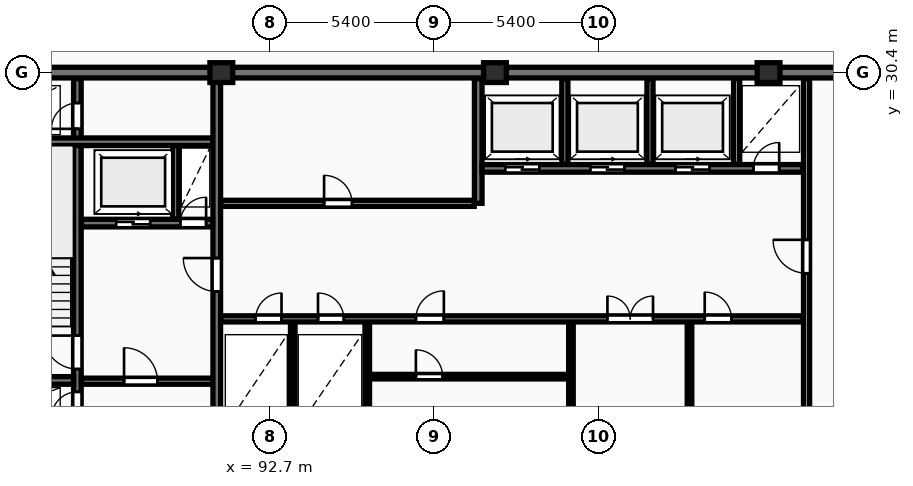
"""IFC4 building model, lengths in metres.
Left out: names, types, materials, properties, quantities, classifications, styles, units other than length and angle.
Written with IfcOpenShell. Run it as: python <this file> out.ifc"""

import sys

from ifc_helpers import new_model, si_unit, direction, frame, frame_2d, origin, origin_2d, place, context, subcontext, project, spatial, rectangle, extrude, element, fill, save


model = new_model("IFC4")
c1 = context("Model", 3, precision=1e-05, world=origin(), true_north=direction((0.0, 1.0)))
c2 = subcontext(c1, "Body", "Model", "MODEL_VIEW")
j1 = project(units=[si_unit("LENGTHUNIT", "METRE"), si_unit("PLANEANGLEUNIT", "RADIAN")], contexts=[c1])
p1 = place(None, origin())
s1 = spatial("IfcSite", under=j1, at=p1, CompositionType="ELEMENT")
p2 = place(p1, origin())
s2 = spatial("IfcBuilding", under=s1, at=p2, CompositionType="ELEMENT")
p3 = place(p2, frame((0.0, 0.0, 201.1)))
s3 = spatial("IfcBuildingStorey", under=s2, at=p3, CompositionType="ELEMENT", Elevation=201.1)
for number, where, z_axis, x_axis in (
    (1, (91.1, 30.4, 0.0), (0.0, 0.0, 1.0), (1.0, 0.0, 0.0)),
    (2, (100.1, 30.4, 0.0), (0.0, 0.0, 1.0), (1.0, 0.0, 0.0)),
    (3, (109.1, 30.4, 0.0), (0.0, 0.0, 1.0), (1.0, 0.0, 0.0)),
):
    element("IfcColumn", number, at=place(p3, frame(where, z_axis=z_axis, x_axis=x_axis)), inside=s3, PredefinedType="COLUMN", context=c2, shape_type="SweptSolid", body=[
        extrude(rectangle(XDim=0.75, YDim=0.65, at=origin_2d()), origin(), (0.0, 0.0, 1.0), 3.25),
    ])
p4 = place(p3, frame((81.925, 30.4, 0.0), z_axis=(0.0, 0.0, 1.0), x_axis=(1.0, 0.0, 0.0)))
e4 = element("IfcWall", 4, at=p4, inside=s3, PredefinedType="SHEAR", context=c2, shape_type="SweptSolid", body=[
    extrude(rectangle(XDim=36.265, YDim=0.35, at=frame_2d((18.132, 0.0))), origin(), (0.0, 0.0, 1.0), 3.25),
])
p5 = place(p3, frame((86.365, 18.6, 0.0), z_axis=(0.0, 0.0, 1.0), x_axis=(0.0, 1.0, 0.0)))
e5 = element("IfcWall", 5, at=p5, inside=s3, PredefinedType="SHEAR", context=c2, shape_type="SweptSolid", body=[
    extrude(rectangle(XDim=11.6, YDim=0.25, at=frame_2d((5.8, 0.0))), origin(), (0.0, 0.0, 1.0), 3.25),
])
p6 = place(p5, frame((0.45, 0.0, 0.0)))
e6 = element("IfcOpeningElement", 6, at=p6, cuts=e5, PredefinedType="OPENING", context=c2, shape_type="SweptSolid", body=[
    extrude(rectangle(XDim=0.85, YDim=2.05, at=frame_2d((0.425, 1.025))), frame((0.0, 0.135, 0.0), z_axis=(0.0, -1.0, 0.0), x_axis=(1.0, 0.0, 0.0)), (0.0, 0.0, 1.0), 0.27),
])
p7 = place(p5, frame((2.05, 0.0, 0.0)))
e7 = element("IfcOpeningElement", 7, at=p7, cuts=e5, PredefinedType="OPENING", context=c2, shape_type="SweptSolid", body=[
    extrude(rectangle(XDim=1.1, YDim=2.1, at=frame_2d((0.55, 1.05))), frame((0.0, 0.135, 0.0), z_axis=(0.0, -1.0, 0.0), x_axis=(1.0, 0.0, 0.0)), (0.0, 0.0, 1.0), 0.27),
])
p8 = place(p5, frame((9.95, 0.0, 0.0)))
e8 = element("IfcOpeningElement", 8, at=p8, cuts=e5, PredefinedType="OPENING", context=c2, shape_type="SweptSolid", body=[
    extrude(rectangle(XDim=0.85, YDim=2.05, at=frame_2d((0.425, 1.025))), frame((0.0, 0.135, 0.0), z_axis=(0.0, -1.0, 0.0), x_axis=(1.0, 0.0, 0.0)), (0.0, 0.0, 1.0), 0.27),
])
p9 = place(p3, frame((83.0, 20.275, 0.0), z_axis=(0.0, 0.0, 1.0), x_axis=(1.0, 0.0, 0.0)))
e9 = element("IfcWall", 9, at=p9, inside=s3, PredefinedType="SHEAR", context=c2, shape_type="SweptSolid", body=[
    extrude(rectangle(XDim=3.24, YDim=0.25, at=frame_2d((1.62, 0.0))), origin(), (0.0, 0.0, 1.0), 3.25),
])
p10 = place(p3, frame((83.0, 28.125, 0.0), z_axis=(0.0, 0.0, 1.0), x_axis=(1.0, 0.0, 0.0)))
e10 = element("IfcWall", 10, at=p10, inside=s3, PredefinedType="SHEAR", context=c2, shape_type="SweptSolid", body=[
    extrude(rectangle(XDim=7.82, YDim=0.25, at=frame_2d((3.91, 0.0))), origin(), (0.0, 0.0, 1.0), 3.25),
])
p11 = place(p3, frame((86.5, 25.45, 0.0), z_axis=(0.0, 0.0, 1.0), x_axis=(1.0, 0.0, 0.0)))
e11 = element("IfcWall", 11, at=p11, inside=s3, PredefinedType="SHEAR", context=c2, shape_type="SweptSolid", body=[
    extrude(rectangle(XDim=4.32, YDim=0.25, at=frame_2d((2.16, 0.0))), origin(), (0.0, 0.0, 1.0), 3.25),
])
p12 = place(p11, frame((1.14, 0.0, 0.0)))
e12 = element("IfcOpeningElement", 12, at=p12, cuts=e11, PredefinedType="OPENING", context=c2, shape_type="SweptSolid", body=[
    extrude(rectangle(XDim=1.12, YDim=2.12, at=frame_2d((0.56, 1.06))), frame((0.0, 0.135, 0.0), z_axis=(0.0, -1.0, 0.0), x_axis=(1.0, 0.0, 0.0)), (0.0, 0.0, 1.0), 0.27),
])
p13 = place(p11, frame((3.25, 0.0, 0.0)))
e13 = element("IfcOpeningElement", 13, at=p13, cuts=e11, PredefinedType="OPENING", context=c2, shape_type="SweptSolid", body=[
    extrude(rectangle(XDim=0.85, YDim=2.05, at=frame_2d((0.425, 1.025))), frame((0.0, 0.135, 0.0), z_axis=(0.0, -1.0, 0.0), x_axis=(1.0, 0.0, 0.0)), (0.0, 0.0, 1.0), 0.27),
])
p14 = place(p3, frame((89.6, 25.58, 0.0), z_axis=(0.0, 0.0, 1.0), x_axis=(0.0, 1.0, 0.0)))
e14 = element("IfcWall", 14, at=p14, inside=s3, PredefinedType="PARTITIONING", context=c2, shape_type="SweptSolid", body=[
    extrude(rectangle(XDim=2.42, YDim=0.2, at=frame_2d((1.21, 0.0))), origin(), (0.0, 0.0, 1.0), 2.97),
])
p15 = place(p3, frame((86.5, 20.25, 0.0), z_axis=(0.0, 0.0, 1.0), x_axis=(1.0, 0.0, 0.0)))
e15 = element("IfcWall", 15, at=p15, inside=s3, PredefinedType="PARTITIONING", context=c2, shape_type="SweptSolid", body=[
    extrude(rectangle(XDim=4.32, YDim=0.2, at=frame_2d((2.16, 0.0))), origin(), (0.0, 0.0, 1.0), 2.97),
])
p16 = place(p15, frame((1.4, 0.0, 0.0)))
e16 = element("IfcOpeningElement", 16, at=p16, cuts=e15, PredefinedType="OPENING", context=c2, shape_type="SweptSolid", body=[
    extrude(rectangle(XDim=1.1, YDim=2.1, at=frame_2d((0.55, 1.05))), frame((0.0, 0.11, 0.0), z_axis=(0.0, -1.0, 0.0), x_axis=(1.0, 0.0, 0.0)), (0.0, 0.0, 1.0), 0.22),
])
p17 = place(p3, frame((90.95, 18.6, 0.0), z_axis=(0.0, 0.0, 1.0), x_axis=(0.0, 1.0, 0.0)))
e17 = element("IfcWall", 17, at=p17, inside=s3, PredefinedType="SHEAR", context=c2, shape_type="SweptSolid", body=[
    extrude(rectangle(XDim=11.6, YDim=0.25, at=frame_2d((5.8, 0.0))), origin(), (0.0, 0.0, 1.0), 3.25),
])
p18 = place(p17, frame((4.6, 0.0, 0.0)))
e18 = element("IfcOpeningElement", 18, at=p18, cuts=e17, PredefinedType="OPENING", context=c2, shape_type="SweptSolid", body=[
    extrude(rectangle(XDim=1.1, YDim=2.1, at=frame_2d((0.55, 1.05))), frame((0.0, 0.135, 0.0), z_axis=(0.0, -1.0, 0.0), x_axis=(1.0, 0.0, 0.0)), (0.0, 0.0, 1.0), 0.27),
])
p19 = place(p3, frame((91.08, 26.1, 0.0), z_axis=(0.0, 0.0, 1.0), x_axis=(1.0, 0.0, 0.0)))
e19 = element("IfcWall", 19, at=p19, inside=s3, PredefinedType="PARTITIONING", context=c2, shape_type="SweptSolid", body=[
    extrude(rectangle(XDim=8.34, YDim=0.2, at=frame_2d((4.17, 0.0))), origin(), (0.0, 0.0, 1.0), 2.97),
])
p20 = place(p19, frame((3.4, 0.0, 0.0)))
e20 = element("IfcOpeningElement", 20, at=p20, cuts=e19, PredefinedType="OPENING", context=c2, shape_type="SweptSolid", body=[
    extrude(rectangle(XDim=0.92, YDim=2.08, at=frame_2d((0.46, 1.04))), frame((0.0, 0.11, 0.0), z_axis=(0.0, -1.0, 0.0), x_axis=(1.0, 0.0, 0.0)), (0.0, 0.0, 1.0), 0.22),
])
p21 = place(p3, frame((99.55, 26.1, 0.0), z_axis=(0.0, 0.0, 1.0), x_axis=(0.0, 1.0, 0.0)))
e21 = element("IfcWall", 21, at=p21, inside=s3, PredefinedType="SHEAR", context=c2, shape_type="SweptSolid", body=[
    extrude(rectangle(XDim=4.1, YDim=0.25, at=frame_2d((2.05, 0.0))), origin(), (0.0, 0.0, 1.0), 3.25),
])
for number, where, z_axis, x_axis in (
    (22, (102.4, 27.38, 0.0), (0.0, 0.0, 1.0), (0.0, 1.0, 0.0)),
    (23, (105.2, 27.38, 0.0), (0.0, 0.0, 1.0), (0.0, 1.0, 0.0)),
    (24, (108.05, 27.38, 0.0), (0.0, 0.0, 1.0), (0.0, 1.0, 0.0)),
):
    element("IfcWall", number, at=place(p3, frame(where, z_axis=z_axis, x_axis=x_axis)), inside=s3, PredefinedType="PARTITIONING", context=c2, shape_type="SweptSolid", body=[
        extrude(rectangle(XDim=2.82, YDim=0.2, at=frame_2d((1.41, 0.0))), origin(), (0.0, 0.0, 1.0), 2.97),
    ])
p22 = place(p3, frame((99.68, 27.25, 0.0), z_axis=(0.0, 0.0, 1.0), x_axis=(1.0, 0.0, 0.0)))
e25 = element("IfcWall", 25, at=p22, inside=s3, PredefinedType="SHEAR", context=c2, shape_type="SweptSolid", body=[
    extrude(rectangle(XDim=10.54, YDim=0.25, at=frame_2d((5.27, 0.0))), origin(), (0.0, 0.0, 1.0), 3.25),
])
p23 = place(p22, frame((0.76, 0.0, 0.0)))
e26 = element("IfcOpeningElement", 26, at=p23, cuts=e25, PredefinedType="OPENING", context=c2, shape_type="SweptSolid", body=[
    extrude(rectangle(XDim=1.12, YDim=2.12, at=frame_2d((0.56, 1.06))), frame((0.0, 0.135, 0.0), z_axis=(0.0, -1.0, 0.0), x_axis=(1.0, 0.0, 0.0)), (0.0, 0.0, 1.0), 0.27),
])
p24 = place(p22, frame((3.56, 0.0, 0.0)))
e27 = element("IfcOpeningElement", 27, at=p24, cuts=e25, PredefinedType="OPENING", context=c2, shape_type="SweptSolid", body=[
    extrude(rectangle(XDim=1.12, YDim=2.12, at=frame_2d((0.56, 1.06))), frame((0.0, 0.135, 0.0), z_axis=(0.0, -1.0, 0.0), x_axis=(1.0, 0.0, 0.0)), (0.0, 0.0, 1.0), 0.27),
])
p25 = place(p22, frame((6.36, 0.0, 0.0)))
e28 = element("IfcOpeningElement", 28, at=p25, cuts=e25, PredefinedType="OPENING", context=c2, shape_type="SweptSolid", body=[
    extrude(rectangle(XDim=1.12, YDim=2.12, at=frame_2d((0.56, 1.06))), frame((0.0, 0.135, 0.0), z_axis=(0.0, -1.0, 0.0), x_axis=(1.0, 0.0, 0.0)), (0.0, 0.0, 1.0), 0.27),
])
p26 = place(p22, frame((8.92, 0.0, 0.0)))
e29 = element("IfcOpeningElement", 29, at=p26, cuts=e25, PredefinedType="OPENING", context=c2, shape_type="SweptSolid", body=[
    extrude(rectangle(XDim=0.85, YDim=2.05, at=frame_2d((0.425, 1.025))), frame((0.0, 0.135, 0.0), z_axis=(0.0, -1.0, 0.0), x_axis=(1.0, 0.0, 0.0)), (0.0, 0.0, 1.0), 0.27),
])
for number, where, z_axis, x_axis in (
    (30, (93.45, 18.6, 0.0), (0.0, 0.0, 1.0), (0.0, 1.0, 0.0)),
    (31, (95.9, 18.6, 0.0), (0.0, 0.0, 1.0), (0.0, 1.0, 0.0)),
):
    element("IfcWall", number, at=place(p3, frame(where, z_axis=z_axis, x_axis=x_axis)), inside=s3, PredefinedType="PARTITIONING", context=c2, shape_type="SweptSolid", body=[
        extrude(rectangle(XDim=3.6, YDim=0.15, at=frame_2d((1.8, 0.0))), origin(), (0.0, 0.0, 1.0), 2.97),
    ])
p27 = place(p3, frame((95.9, 20.4, 0.0), z_axis=(0.0, 0.0, 1.0), x_axis=(1.0, 0.0, 0.0)))
e32 = element("IfcWall", 32, at=p27, inside=s3, PredefinedType="PARTITIONING", context=c2, shape_type="SweptSolid", body=[
    extrude(rectangle(XDim=6.7, YDim=0.15, at=frame_2d((3.35, 0.0))), origin(), (0.0, 0.0, 1.0), 2.97),
])
p28 = place(p27, frame((1.6, 0.0, 0.0)))
e33 = element("IfcOpeningElement", 33, at=p28, cuts=e32, PredefinedType="OPENING", context=c2, shape_type="SweptSolid", body=[
    extrude(rectangle(XDim=0.88, YDim=2.06, at=frame_2d((0.44, 1.03))), frame((0.0, 0.085, 0.0), z_axis=(0.0, -1.0, 0.0), x_axis=(1.0, 0.0, 0.0)), (0.0, 0.0, 1.0), 0.17),
])
for number, where, z_axis, x_axis in (
    (34, (102.6, 18.6, 0.0), (0.0, 0.0, 1.0), (0.0, 1.0, 0.0)),
    (35, (106.5, 18.6, 0.0), (0.0, 0.0, 1.0), (0.0, 1.0, 0.0)),
):
    element("IfcWall", number, at=place(p3, frame(where, z_axis=z_axis, x_axis=x_axis)), inside=s3, PredefinedType="PARTITIONING", context=c2, shape_type="SweptSolid", body=[
        extrude(rectangle(XDim=3.6, YDim=0.15, at=frame_2d((1.8, 0.0))), origin(), (0.0, 0.0, 1.0), 2.97),
    ])
p29 = place(p3, frame((91.08, 22.3, 0.0), z_axis=(0.0, 0.0, 1.0), x_axis=(1.0, 0.0, 0.0)))
e36 = element("IfcWall", 36, at=p29, inside=s3, PredefinedType="PARTITIONING", context=c2, shape_type="SweptSolid", body=[
    extrude(rectangle(XDim=19.14, YDim=0.2, at=frame_2d((9.57, 0.0))), origin(), (0.0, 0.0, 1.0), 2.97),
])
p30 = place(p29, frame((1.15, 0.0, 0.0)))
e37 = element("IfcOpeningElement", 37, at=p30, cuts=e36, PredefinedType="OPENING", context=c2, shape_type="SweptSolid", body=[
    extrude(rectangle(XDim=0.85, YDim=2.05, at=frame_2d((0.425, 1.025))), frame((0.0, 0.11, 0.0), z_axis=(0.0, -1.0, 0.0), x_axis=(1.0, 0.0, 0.0)), (0.0, 0.0, 1.0), 0.22),
])
p31 = place(p29, frame((3.2, 0.0, 0.0)))
e38 = element("IfcOpeningElement", 38, at=p31, cuts=e36, PredefinedType="OPENING", context=c2, shape_type="SweptSolid", body=[
    extrude(rectangle(XDim=0.85, YDim=2.05, at=frame_2d((0.425, 1.025))), frame((0.0, 0.11, 0.0), z_axis=(0.0, -1.0, 0.0), x_axis=(1.0, 0.0, 0.0)), (0.0, 0.0, 1.0), 0.22),
])
p32 = place(p29, frame((12.72, 0.0, 0.0)))
e39 = element("IfcOpeningElement", 39, at=p32, cuts=e36, PredefinedType="OPENING", context=c2, shape_type="SweptSolid", body=[
    extrude(rectangle(XDim=1.5, YDim=2.2, at=frame_2d((0.75, 1.1))), frame((0.0, 0.11, 0.0), z_axis=(0.0, -1.0, 0.0), x_axis=(1.0, 0.0, 0.0)), (0.0, 0.0, 1.0), 0.22),
])
p33 = place(p29, frame((6.42, 0.0, 0.0)))
e40 = element("IfcOpeningElement", 40, at=p33, cuts=e36, PredefinedType="OPENING", context=c2, shape_type="SweptSolid", body=[
    extrude(rectangle(XDim=0.92, YDim=2.08, at=frame_2d((0.46, 1.04))), frame((0.0, 0.11, 0.0), z_axis=(0.0, -1.0, 0.0), x_axis=(1.0, 0.0, 0.0)), (0.0, 0.0, 1.0), 0.22),
])
p34 = place(p29, frame((15.92, 0.0, 0.0)))
e41 = element("IfcOpeningElement", 41, at=p34, cuts=e36, PredefinedType="OPENING", context=c2, shape_type="SweptSolid", body=[
    extrude(rectangle(XDim=0.88, YDim=2.06, at=frame_2d((0.44, 1.03))), frame((0.0, 0.11, 0.0), z_axis=(0.0, -1.0, 0.0), x_axis=(1.0, 0.0, 0.0)), (0.0, 0.0, 1.0), 0.22),
])
p35 = place(p3, frame((110.35, 18.6, 0.0), z_axis=(0.0, 0.0, 1.0), x_axis=(0.0, 1.0, 0.0)))
e42 = element("IfcWall", 42, at=p35, inside=s3, PredefinedType="PARTITIONING", context=c2, shape_type="SweptSolid", body=[
    extrude(rectangle(XDim=11.6, YDim=0.2, at=frame_2d((5.8, 0.0))), origin(), (0.0, 0.0, 1.0), 2.97),
])
p36 = place(p35, frame((5.2, 0.0, 0.0)))
e43 = element("IfcOpeningElement", 43, at=p36, cuts=e42, PredefinedType="OPENING", context=c2, shape_type="SweptSolid", body=[
    extrude(rectangle(XDim=1.1, YDim=2.15, at=frame_2d((0.55, 1.075))), frame((0.0, 0.11, 0.0), z_axis=(0.0, -1.0, 0.0), x_axis=(1.0, 0.0, 0.0)), (0.0, 0.0, 1.0), 0.22),
])
p37 = place(p6, origin())
e44 = element("IfcDoor", 44, at=p37, inside=s3, OperationType="SINGLE_SWING_LEFT", PredefinedType="DOOR", context=c2, shape_type="SweptSolid", body=[
    extrude(rectangle(XDim=0.85, YDim=2.05, at=frame_2d((0.425, 1.025))), frame((0.0, 0.025, 0.0), z_axis=(0.0, -1.0, 0.0), x_axis=(1.0, 0.0, 0.0)), (0.0, 0.0, 1.0), 0.05),
])
fill(e6, e44)
p38 = place(p7, origin())
e45 = element("IfcDoor", 45, at=p38, inside=s3, OperationType="SINGLE_SWING_RIGHT", PredefinedType="DOOR", context=c2, shape_type="SweptSolid", body=[
    extrude(rectangle(XDim=1.1, YDim=2.1, at=frame_2d((0.55, 1.05))), frame((0.0, 0.025, 0.0), z_axis=(0.0, -1.0, 0.0), x_axis=(1.0, 0.0, 0.0)), (0.0, 0.0, 1.0), 0.05),
])
fill(e7, e45)
p39 = place(p8, origin())
e46 = element("IfcDoor", 46, at=p39, inside=s3, OperationType="SINGLE_SWING_LEFT", PredefinedType="DOOR", context=c2, shape_type="SweptSolid", body=[
    extrude(rectangle(XDim=0.85, YDim=2.05, at=frame_2d((0.425, 1.025))), frame((0.0, 0.025, 0.0), z_axis=(0.0, -1.0, 0.0), x_axis=(1.0, 0.0, 0.0)), (0.0, 0.0, 1.0), 0.05),
])
fill(e8, e46)
p40 = place(p12, origin())
e47 = element("IfcDoor", 47, at=p40, inside=s3, OperationType="SLIDING_TO_RIGHT", PredefinedType="DOOR", context=c2, shape_type="SweptSolid", body=[
    extrude(rectangle(XDim=1.12, YDim=2.12, at=frame_2d((0.56, 1.06))), frame((0.0, 0.025, 0.0), z_axis=(0.0, -1.0, 0.0), x_axis=(1.0, 0.0, 0.0)), (0.0, 0.0, 1.0), 0.05),
])
fill(e12, e47)
p41 = place(p13, origin())
e48 = element("IfcDoor", 48, at=p41, inside=s3, OperationType="SINGLE_SWING_RIGHT", PredefinedType="DOOR", context=c2, shape_type="SweptSolid", body=[
    extrude(rectangle(XDim=0.85, YDim=2.05, at=frame_2d((0.425, 1.025))), frame((0.0, 0.025, 0.0), z_axis=(0.0, -1.0, 0.0), x_axis=(1.0, 0.0, 0.0)), (0.0, 0.0, 1.0), 0.05),
])
fill(e13, e48)
p42 = place(p16, origin())
e49 = element("IfcDoor", 49, at=p42, inside=s3, OperationType="SINGLE_SWING_LEFT", PredefinedType="DOOR", context=c2, shape_type="SweptSolid", body=[
    extrude(rectangle(XDim=1.1, YDim=2.1, at=frame_2d((0.55, 1.05))), frame((0.0, 0.025, 0.0), z_axis=(0.0, -1.0, 0.0), x_axis=(1.0, 0.0, 0.0)), (0.0, 0.0, 1.0), 0.05),
])
fill(e16, e49)
p43 = place(p18, origin())
e50 = element("IfcDoor", 50, at=p43, inside=s3, OperationType="SINGLE_SWING_RIGHT", PredefinedType="DOOR", context=c2, shape_type="SweptSolid", body=[
    extrude(rectangle(XDim=1.1, YDim=2.1, at=frame_2d((0.55, 1.05))), frame((0.0, 0.025, 0.0), z_axis=(0.0, -1.0, 0.0), x_axis=(1.0, 0.0, 0.0)), (0.0, 0.0, 1.0), 0.05),
])
fill(e18, e50)
p44 = place(p20, origin())
e51 = element("IfcDoor", 51, at=p44, inside=s3, OperationType="SINGLE_SWING_LEFT", PredefinedType="DOOR", context=c2, shape_type="SweptSolid", body=[
    extrude(rectangle(XDim=0.92, YDim=2.08, at=frame_2d((0.46, 1.04))), frame((0.0, 0.025, 0.0), z_axis=(0.0, -1.0, 0.0), x_axis=(1.0, 0.0, 0.0)), (0.0, 0.0, 1.0), 0.05),
])
fill(e20, e51)
p45 = place(p23, origin())
e52 = element("IfcDoor", 52, at=p45, inside=s3, OperationType="SLIDING_TO_RIGHT", PredefinedType="DOOR", context=c2, shape_type="SweptSolid", body=[
    extrude(rectangle(XDim=1.12, YDim=2.12, at=frame_2d((0.56, 1.06))), frame((0.0, 0.025, 0.0), z_axis=(0.0, -1.0, 0.0), x_axis=(1.0, 0.0, 0.0)), (0.0, 0.0, 1.0), 0.05),
])
fill(e26, e52)
p46 = place(p24, origin())
e53 = element("IfcDoor", 53, at=p46, inside=s3, OperationType="SLIDING_TO_RIGHT", PredefinedType="DOOR", context=c2, shape_type="SweptSolid", body=[
    extrude(rectangle(XDim=1.12, YDim=2.12, at=frame_2d((0.56, 1.06))), frame((0.0, 0.025, 0.0), z_axis=(0.0, -1.0, 0.0), x_axis=(1.0, 0.0, 0.0)), (0.0, 0.0, 1.0), 0.05),
])
fill(e27, e53)
p47 = place(p25, origin())
e54 = element("IfcDoor", 54, at=p47, inside=s3, OperationType="SLIDING_TO_RIGHT", PredefinedType="DOOR", context=c2, shape_type="SweptSolid", body=[
    extrude(rectangle(XDim=1.12, YDim=2.12, at=frame_2d((0.56, 1.06))), frame((0.0, 0.025, 0.0), z_axis=(0.0, -1.0, 0.0), x_axis=(1.0, 0.0, 0.0)), (0.0, 0.0, 1.0), 0.05),
])
fill(e28, e54)
p48 = place(p26, origin())
e55 = element("IfcDoor", 55, at=p48, inside=s3, OperationType="SINGLE_SWING_RIGHT", PredefinedType="DOOR", context=c2, shape_type="SweptSolid", body=[
    extrude(rectangle(XDim=0.85, YDim=2.05, at=frame_2d((0.425, 1.025))), frame((0.0, 0.025, 0.0), z_axis=(0.0, -1.0, 0.0), x_axis=(1.0, 0.0, 0.0)), (0.0, 0.0, 1.0), 0.05),
])
fill(e29, e55)
p49 = place(p28, origin())
e56 = element("IfcDoor", 56, at=p49, inside=s3, OperationType="SINGLE_SWING_LEFT", PredefinedType="DOOR", context=c2, shape_type="SweptSolid", body=[
    extrude(rectangle(XDim=0.88, YDim=2.06, at=frame_2d((0.44, 1.03))), frame((0.0, 0.025, 0.0), z_axis=(0.0, -1.0, 0.0), x_axis=(1.0, 0.0, 0.0)), (0.0, 0.0, 1.0), 0.05),
])
fill(e33, e56)
p50 = place(p30, origin())
e57 = element("IfcDoor", 57, at=p50, inside=s3, OperationType="SINGLE_SWING_RIGHT", PredefinedType="DOOR", context=c2, shape_type="SweptSolid", body=[
    extrude(rectangle(XDim=0.85, YDim=2.05, at=frame_2d((0.425, 1.025))), frame((0.0, 0.025, 0.0), z_axis=(0.0, -1.0, 0.0), x_axis=(1.0, 0.0, 0.0)), (0.0, 0.0, 1.0), 0.05),
])
fill(e37, e57)
p51 = place(p31, origin())
e58 = element("IfcDoor", 58, at=p51, inside=s3, OperationType="SINGLE_SWING_LEFT", PredefinedType="DOOR", context=c2, shape_type="SweptSolid", body=[
    extrude(rectangle(XDim=0.85, YDim=2.05, at=frame_2d((0.425, 1.025))), frame((0.0, 0.025, 0.0), z_axis=(0.0, -1.0, 0.0), x_axis=(1.0, 0.0, 0.0)), (0.0, 0.0, 1.0), 0.05),
])
fill(e38, e58)
p52 = place(p32, origin())
e59 = element("IfcDoor", 59, at=p52, inside=s3, OperationType="DOUBLE_DOOR_SINGLE_SWING", PredefinedType="DOOR", context=c2, shape_type="SweptSolid", body=[
    extrude(rectangle(XDim=1.5, YDim=2.2, at=frame_2d((0.75, 1.1))), frame((0.0, 0.025, 0.0), z_axis=(0.0, -1.0, 0.0), x_axis=(1.0, 0.0, 0.0)), (0.0, 0.0, 1.0), 0.05),
])
fill(e39, e59)
p53 = place(p33, origin())
e60 = element("IfcDoor", 60, at=p53, inside=s3, OperationType="SINGLE_SWING_RIGHT", PredefinedType="DOOR", context=c2, shape_type="SweptSolid", body=[
    extrude(rectangle(XDim=0.92, YDim=2.08, at=frame_2d((0.46, 1.04))), frame((0.0, 0.025, 0.0), z_axis=(0.0, -1.0, 0.0), x_axis=(1.0, 0.0, 0.0)), (0.0, 0.0, 1.0), 0.05),
])
fill(e40, e60)
p54 = place(p34, origin())
e61 = element("IfcDoor", 61, at=p54, inside=s3, OperationType="SINGLE_SWING_LEFT", PredefinedType="DOOR", context=c2, shape_type="SweptSolid", body=[
    extrude(rectangle(XDim=0.88, YDim=2.06, at=frame_2d((0.44, 1.03))), frame((0.0, 0.025, 0.0), z_axis=(0.0, -1.0, 0.0), x_axis=(1.0, 0.0, 0.0)), (0.0, 0.0, 1.0), 0.05),
])
fill(e41, e61)
p55 = place(p36, origin())
e62 = element("IfcDoor", 62, at=p55, inside=s3, OperationType="SINGLE_SWING_RIGHT", PredefinedType="DOOR", context=c2, shape_type="SweptSolid", body=[
    extrude(rectangle(XDim=1.1, YDim=2.15, at=frame_2d((0.55, 1.075))), frame((0.0, 0.025, 0.0), z_axis=(0.0, -1.0, 0.0), x_axis=(1.0, 0.0, 0.0)), (0.0, 0.0, 1.0), 0.05),
])
fill(e43, e62)
save(model, sys.argv[1])
